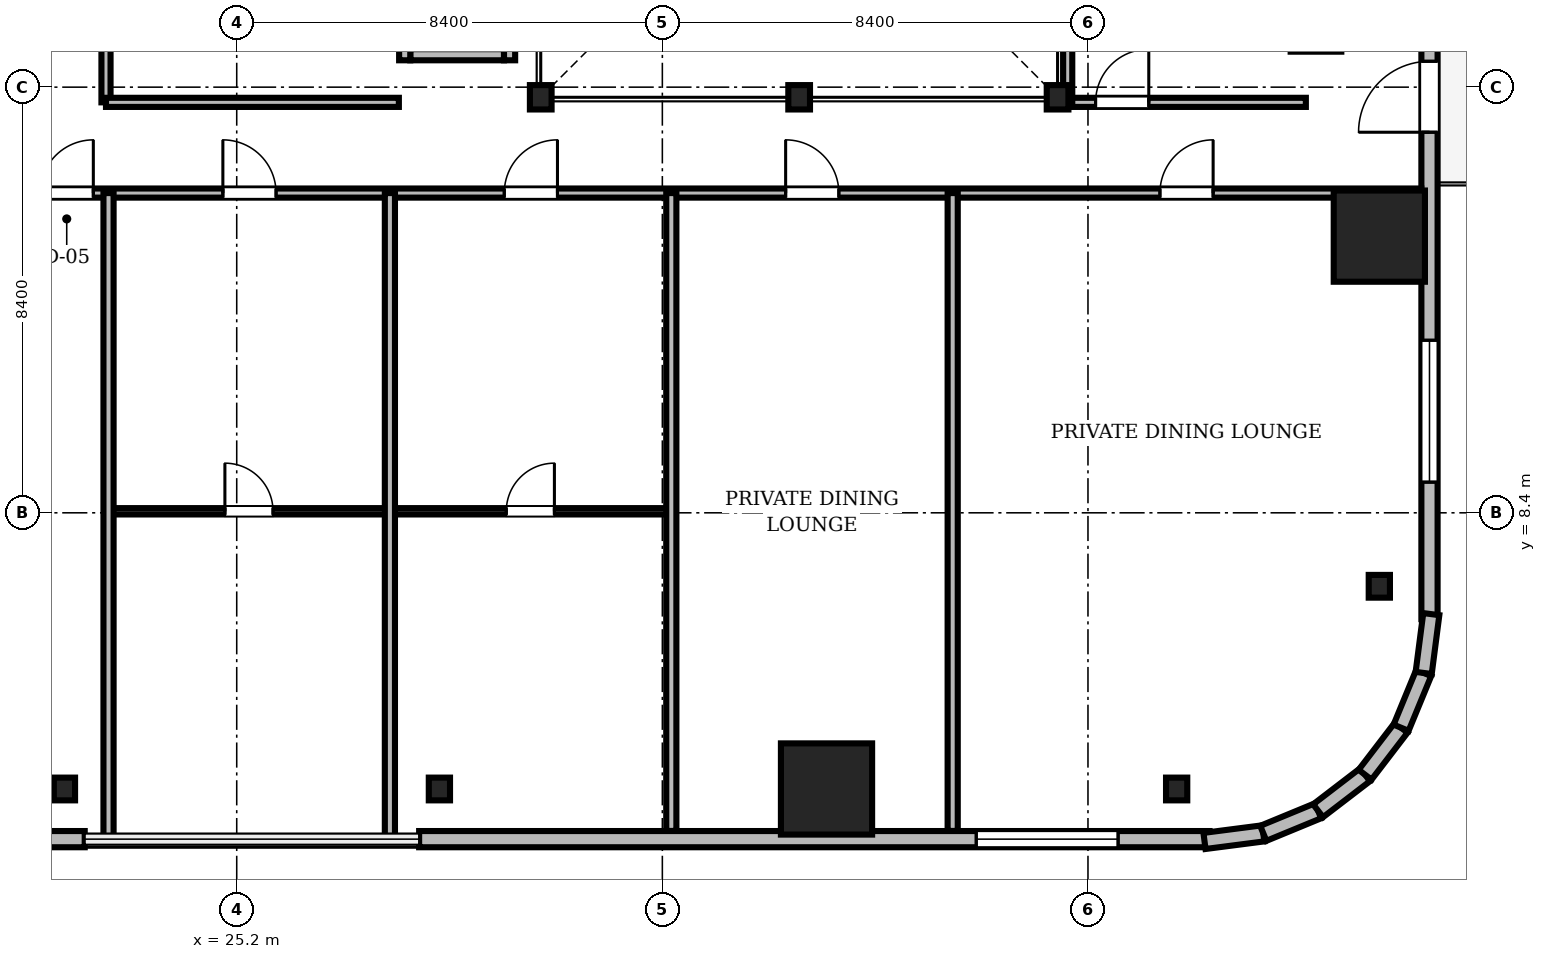
"""IFC4 building model, lengths in metres.
Left out: names, types, materials, properties, quantities, classifications, styles, units other than length and angle.
Written with IfcOpenShell. Run it as: python <this file> out.ifc"""

import sys

from ifc_helpers import new_model, si_unit, direction, frame, frame_2d, origin, origin_2d, place, context, subcontext, project, spatial, rectangle, i_section, extrude, source, transform, mapped, element, fill, save


model = new_model("IFC4")
c1 = context("Model", 3, precision=1e-05, world=origin(), true_north=direction((0.0, 1.0)))
c2 = subcontext(c1, "Body", "Model", "MODEL_VIEW")
j1 = project(units=[si_unit("LENGTHUNIT", "METRE"), si_unit("PLANEANGLEUNIT", "RADIAN")], contexts=[c1])
p1 = place(None, origin())
s1 = spatial("IfcSite", under=j1, at=p1, CompositionType="ELEMENT")
p2 = place(p1, origin())
s2 = spatial("IfcBuilding", under=s1, at=p2, CompositionType="ELEMENT")
p3 = place(p2, frame((0.0, 0.0, 71.4)))
s3 = spatial("IfcBuildingStorey", under=s2, at=p3, CompositionType="ELEMENT", Elevation=71.4)
m1 = source(origin(), c2, "Body", "SweptSolid", [
    extrude(i_section(OverallWidth=0.428, OverallDepth=0.481, WebThickness=0.04, FlangeThickness=0.063, FilletRadius=0.015, at=origin_2d()), origin(), (0.0, 0.0, 1.0), 3.41),
])
for number, where, z_axis, x_axis in (
    (1, (31.2, 16.6, 0.0), (0.0, 0.0, 1.0), (1.0, 0.0, 0.0)),
    (2, (36.3, 16.6, 0.0), (0.0, 0.0, 1.0), (1.0, 0.0, 0.0)),
    (3, (41.4, 16.6, 0.0), (0.0, 0.0, 1.0), (1.0, 0.0, 0.0)),
):
    element("IfcColumn", number, at=place(p3, frame(where, z_axis=z_axis, x_axis=x_axis)), inside=s3, PredefinedType="COLUMN", context=c2, shape_type="MappedRepresentation", body=[
        mapped(m1, transform((0.0, 0.0, 0.0), scale=1.0)),
    ])
m2 = source(origin(), c2, "Body", "SweptSolid", [
    extrude(rectangle(XDim=1.8, YDim=1.8, at=origin_2d()), origin(), (0.0, 0.0, 1.0), 3.41),
])
for number, where, z_axis, x_axis in (
    (4, (36.84, 2.95, 0.0), (0.0, 0.0, 1.0), (1.0, 0.0, 0.0)),
    (5, (47.75, 13.86, 0.0), (0.0, 0.0, 1.0), (1.0, 0.0, 0.0)),
):
    element("IfcColumn", number, at=place(p3, frame(where, z_axis=z_axis, x_axis=x_axis)), inside=s3, PredefinedType="COLUMN", context=c2, shape_type="MappedRepresentation", body=[
        mapped(m2, transform((0.0, 0.0, 0.0), scale=1.0)),
    ])
m3 = source(origin(), c2, "Body", "SweptSolid", [
    extrude(i_section(OverallWidth=0.419, OverallDepth=0.449, WebThickness=0.031, FlangeThickness=0.048, FilletRadius=0.015, at=origin_2d()), origin(), (0.0, 0.0, 1.0), 3.41),
])
for number, where, z_axis, x_axis in (
    (6, (21.8, 2.95, 0.0), (0.0, 0.0, 1.0), (1.0, 0.0, 0.0)),
    (7, (29.2, 2.95, 0.0), (0.0, 0.0, 1.0), (1.0, 0.0, 0.0)),
    (8, (43.75, 2.95, 0.0), (0.0, 0.0, 1.0), (1.0, 0.0, 0.0)),
    (9, (47.75, 6.95, 0.0), (0.0, 0.0, 1.0), (1.0, 0.0, 0.0)),
):
    element("IfcColumn", number, at=place(p3, frame(where, z_axis=z_axis, x_axis=x_axis)), inside=s3, PredefinedType="COLUMN", context=c2, shape_type="MappedRepresentation", body=[
        mapped(m3, transform((0.0, 0.0, 0.0), scale=1.0)),
    ])
m4 = source(origin(), c2, "Body", "SweptSolid", [
    extrude(rectangle(XDim=15.6, YDim=0.32, at=frame_2d((7.8, 0.0))), origin(), (0.0, 0.0, 1.0), 3.41),
])
p4 = place(p3, frame((6.6, 1.96, 0.0), z_axis=(0.0, 0.0, 1.0), x_axis=(1.0, 0.0, 0.0)))
e10 = element("IfcWall", 10, at=p4, inside=s3, PredefinedType="SOLIDWALL", context=c2, shape_type="MappedRepresentation", body=[
    mapped(m4, transform((0.0, 0.0, 0.0), scale=1.0)),
])
m5 = source(origin(), c2, "Body", "SweptSolid", [
    extrude(rectangle(XDim=1.4, YDim=2.3, at=frame_2d((0.7, 1.15))), frame((0.0, 0.17, 0.0), z_axis=(0.0, -1.0, 0.0), x_axis=(1.0, 0.0, 0.0)), (0.0, 0.0, 1.0), 0.34),
])
p5 = place(p4, frame((9.61, 0.0, 0.0)))
e11 = element("IfcOpeningElement", 11, at=p5, cuts=e10, PredefinedType="OPENING", context=c2, shape_type="MappedRepresentation", body=[
    mapped(m5, transform((0.0, 0.0, 0.0), scale=1.0)),
])
m6 = source(origin(), c2, "Body", "SweptSolid", [
    extrude(rectangle(XDim=2.8, YDim=2.4, at=frame_2d((1.4, 1.2))), frame((0.0, 0.17, 0.0), z_axis=(0.0, -1.0, 0.0), x_axis=(1.0, 0.0, 0.0)), (0.0, 0.0, 1.0), 0.34),
])
p6 = place(p4, frame((2.705, 0.0, 0.72)))
e12 = element("IfcOpeningElement", 12, at=p6, cuts=e10, PredefinedType="OPENING", context=c2, shape_type="MappedRepresentation", body=[
    mapped(m6, transform((0.0, 0.0, 0.0), scale=1.0)),
])
p7 = place(p3, frame((28.8, 1.96, 0.0), z_axis=(0.0, 0.0, 1.0), x_axis=(1.0, 0.0, 0.0)))
e13 = element("IfcWall", 13, at=p7, inside=s3, PredefinedType="SOLIDWALL", context=c2, shape_type="MappedRepresentation", body=[
    mapped(m4, transform((0.0, 0.0, 0.0), scale=1.0)),
])
p8 = place(p7, frame((10.995, 0.0, 0.72)))
e14 = element("IfcOpeningElement", 14, at=p8, cuts=e13, PredefinedType="OPENING", context=c2, shape_type="MappedRepresentation", body=[
    mapped(m6, transform((0.0, 0.0, 0.0), scale=1.0)),
])
p9 = place(p3, frame((48.74, 6.3, 0.0), z_axis=(0.0, 0.0, 1.0), x_axis=(0.0, 1.0, 0.0)))
e15 = element("IfcWall", 15, at=p9, inside=s3, PredefinedType="SOLIDWALL", context=c2, shape_type="MappedRepresentation", body=[
    mapped(m4, transform((0.0, 0.0, 0.0), scale=1.0)),
])
p10 = place(p9, frame((9.61, 0.0, 0.0)))
e16 = element("IfcOpeningElement", 16, at=p10, cuts=e15, PredefinedType="OPENING", context=c2, shape_type="MappedRepresentation", body=[
    mapped(m5, transform((0.0, 0.0, 0.0), scale=1.0)),
])
p11 = place(p9, frame((2.705, 0.0, 0.72)))
e17 = element("IfcOpeningElement", 17, at=p11, cuts=e15, PredefinedType="OPENING", context=c2, shape_type="MappedRepresentation", body=[
    mapped(m6, transform((0.0, 0.0, 0.0), scale=1.0)),
])
m7 = source(origin(), c2, "Body", "SweptSolid", [
    extrude(rectangle(XDim=1.17, YDim=0.32, at=frame_2d((0.585, 0.0))), origin(), (0.0, 0.0, 1.0), 3.41),
])
p12 = place(p3, frame((44.3, 1.925, 0.0), z_axis=(0.0, 0.0, 1.0), x_axis=(0.991762485493, 0.128090485085, 0.0)))
e18 = element("IfcWall", 18, at=p12, inside=s3, PredefinedType="SOLIDWALL", context=c2, shape_type="MappedRepresentation", body=[
    mapped(m7, transform((0.0, 0.0, 0.0), scale=1.0)),
])
m8 = source(origin(), c2, "Body", "SweptSolid", [
    extrude(rectangle(XDim=1.169, YDim=0.32, at=frame_2d((0.585, 0.0))), origin(), (0.0, 0.0, 1.0), 3.41),
])
p13 = place(p3, frame((45.46, 2.074, 0.0), z_axis=(0.0, 0.0, 1.0), x_axis=(0.924479075121, 0.381232789334, 0.0)))
e19 = element("IfcWall", 19, at=p13, inside=s3, PredefinedType="SOLIDWALL", context=c2, shape_type="MappedRepresentation", body=[
    mapped(m8, transform((0.0, 0.0, 0.0), scale=1.0)),
])
m9 = source(origin(), c2, "Body", "SweptSolid", [
    extrude(rectangle(XDim=1.169, YDim=0.32, at=frame_2d((0.584, 0.0))), origin(), (0.0, 0.0, 1.0), 3.41),
])
p14 = place(p3, frame((46.541, 2.52, 0.0), z_axis=(0.0, 0.0, 1.0), x_axis=(0.793663520347, 0.608356981114, 0.0)))
e20 = element("IfcWall", 20, at=p14, inside=s3, PredefinedType="SOLIDWALL", context=c2, shape_type="MappedRepresentation", body=[
    mapped(m9, transform((0.0, 0.0, 0.0), scale=1.0)),
])
m10 = source(origin(), c2, "Body", "SweptSolid", [
    extrude(rectangle(XDim=1.169, YDim=0.32, at=frame_2d((0.584, 0.0))), origin(), (0.0, 0.0, 1.0), 3.41),
])
for number, where, z_axis, x_axis in (
    (21, (47.469, 3.231, 0.0), (0.0, 0.0, 1.0), (0.608, 0.794, 0.0)),
    (22, (48.18, 4.159, 0.0), (0.0, 0.0, 1.0), (0.381, 0.925, 0.0)),
):
    element("IfcWall", number, at=place(p3, frame(where, z_axis=z_axis, x_axis=x_axis)), inside=s3, PredefinedType="SOLIDWALL", context=c2, shape_type="MappedRepresentation", body=[
        mapped(m10, transform((0.0, 0.0, 0.0), scale=1.0)),
    ])
m11 = source(origin(), c2, "Body", "SweptSolid", [
    extrude(rectangle(XDim=1.171, YDim=0.32, at=frame_2d((0.585, 0.0))), origin(), (0.0, 0.0, 1.0), 3.41),
])
p15 = place(p3, frame((48.625, 5.24, 0.0), z_axis=(0.0, 0.0, 1.0), x_axis=(0.128269133229, 0.991739395941, 0.0)))
e23 = element("IfcWall", 23, at=p15, inside=s3, PredefinedType="SOLIDWALL", context=c2, shape_type="MappedRepresentation", body=[
    mapped(m11, transform((0.0, 0.0, 0.0), scale=1.0)),
])
m12 = source(origin(), c2, "Body", "SweptSolid", [
    extrude(rectangle(XDim=1.85, YDim=0.22, at=frame_2d((0.925, 0.0))), origin(), (0.0, 0.0, 1.0), 3.41),
])
p16 = place(p3, frame((28.625, 17.44, 0.0), z_axis=(0.0, 0.0, 1.0), x_axis=(1.0, 0.0, 0.0)))
e24 = element("IfcWall", 24, at=p16, inside=s3, PredefinedType="SOLIDWALL", context=c2, shape_type="MappedRepresentation", body=[
    mapped(m12, transform((0.0, 0.0, 0.0), scale=1.0)),
])
m13 = source(origin(), c2, "Body", "SweptSolid", [
    extrude(rectangle(XDim=2.54, YDim=0.22, at=frame_2d((1.27, 0.0))), origin(), (0.0, 0.0, 1.0), 3.41),
])
for number, where, z_axis, x_axis in (
    (25, (28.515, 17.33, 0.0), (0.0, 0.0, 1.0), (0.0, 1.0, 0.0)),
    (26, (30.585, 17.33, 0.0), (0.0, 0.0, 1.0), (0.0, 1.0, 0.0)),
):
    element("IfcWall", number, at=place(p3, frame(where, z_axis=z_axis, x_axis=x_axis)), inside=s3, PredefinedType="SOLIDWALL", context=c2, shape_type="MappedRepresentation", body=[
        mapped(m13, transform((0.0, 0.0, 0.0), scale=1.0)),
    ])
m14 = source(origin(), c2, "Body", "SweptSolid", [
    extrude(rectangle(XDim=46.156, YDim=0.18, at=frame_2d((23.078, 0.0))), origin(), (0.0, 0.0, 1.0), 2.652),
])
p17 = place(p3, frame((2.422, 14.71, 0.0), z_axis=(0.0, 0.0, 1.0), x_axis=(1.0, 0.0, 0.0)))
e27 = element("IfcWall", 27, at=p17, inside=s3, PredefinedType="PARTITIONING", context=c2, shape_type="MappedRepresentation", body=[
    mapped(m14, transform((0.0, 0.0, 0.0), scale=1.0)),
])
m15 = source(origin(), c2, "Body", "SweptSolid", [
    extrude(rectangle(XDim=1.05, YDim=2.2, at=frame_2d((0.525, 1.1))), frame((0.0, 0.1, 0.0), z_axis=(0.0, -1.0, 0.0), x_axis=(1.0, 0.0, 0.0)), (0.0, 0.0, 1.0), 0.2),
])
p18 = place(p17, frame((18.898, 0.0, 0.0)))
e28 = element("IfcOpeningElement", 28, at=p18, cuts=e27, PredefinedType="OPENING", context=c2, shape_type="MappedRepresentation", body=[
    mapped(m15, transform((0.0, 0.0, 0.0), scale=1.0)),
])
p19 = place(p17, frame((22.505, 0.0, 0.0)))
e29 = element("IfcOpeningElement", 29, at=p19, cuts=e27, PredefinedType="OPENING", context=c2, shape_type="MappedRepresentation", body=[
    mapped(m15, transform((0.0, 0.0, 0.0), scale=1.0)),
])
p20 = place(p17, frame((28.058, 0.0, 0.0)))
e30 = element("IfcOpeningElement", 30, at=p20, cuts=e27, PredefinedType="OPENING", context=c2, shape_type="MappedRepresentation", body=[
    mapped(m15, transform((0.0, 0.0, 0.0), scale=1.0)),
])
p21 = place(p17, frame((33.611, 0.0, 0.0)))
e31 = element("IfcOpeningElement", 31, at=p21, cuts=e27, PredefinedType="OPENING", context=c2, shape_type="MappedRepresentation", body=[
    mapped(m15, transform((0.0, 0.0, 0.0), scale=1.0)),
])
p22 = place(p17, frame((40.998, 0.0, 0.0)))
e32 = element("IfcOpeningElement", 32, at=p22, cuts=e27, PredefinedType="OPENING", context=c2, shape_type="MappedRepresentation", body=[
    mapped(m15, transform((0.0, 0.0, 0.0), scale=1.0)),
])
m16 = source(origin(), c2, "Body", "SweptSolid", [
    extrude(rectangle(XDim=11.94, YDim=0.18, at=frame_2d((5.97, 0.0))), origin(), (0.0, 0.0, 1.0), 2.802),
])
p23 = place(p3, frame((22.62, 16.5, 0.0), z_axis=(0.0, 0.0, 1.0), x_axis=(0.0, 1.0, 0.0)))
e33 = element("IfcWall", 33, at=p23, inside=s3, PredefinedType="PARTITIONING", context=c2, shape_type="MappedRepresentation", body=[
    mapped(m16, transform((0.0, 0.0, 0.0), scale=1.0)),
])
p24 = place(p23, frame((4.5, 0.0, 0.0)))
e34 = element("IfcOpeningElement", 34, at=p24, cuts=e33, PredefinedType="OPENING", context=c2, shape_type="MappedRepresentation", body=[
    mapped(m15, transform((0.0, 0.0, 0.0), scale=1.0)),
])
m17 = source(origin(), c2, "Body", "SweptSolid", [
    extrude(rectangle(XDim=5.554, YDim=0.125, at=frame_2d((2.777, 0.0))), origin(), (0.0, 0.0, 1.0), 2.802),
])
p25 = place(p3, frame((28.223, 8.43, 0.0), z_axis=(0.0, 0.0, 1.0), x_axis=(1.0, 0.0, 0.0)))
e35 = element("IfcWall", 35, at=p25, inside=s3, PredefinedType="PARTITIONING", context=c2, shape_type="MappedRepresentation", body=[
    mapped(m17, transform((0.0, 0.0, 0.0), scale=1.0)),
])
m18 = source(origin(), c2, "Body", "SweptSolid", [
    extrude(rectangle(XDim=0.95, YDim=2.15, at=frame_2d((0.475, 1.075))), frame((0.0, 0.073, 0.0), z_axis=(0.0, -1.0, 0.0), x_axis=(1.0, 0.0, 0.0)), (0.0, 0.0, 1.0), 0.145),
])
p26 = place(p25, frame((2.297, 0.0, 0.0)))
e36 = element("IfcOpeningElement", 36, at=p26, cuts=e35, PredefinedType="OPENING", context=c2, shape_type="MappedRepresentation", body=[
    mapped(m18, transform((0.0, 0.0, 0.0), scale=1.0)),
])
m19 = source(origin(), c2, "Body", "SweptSolid", [
    extrude(rectangle(XDim=5.553, YDim=0.125, at=frame_2d((2.776, 0.0))), origin(), (0.0, 0.0, 1.0), 2.802),
])
p27 = place(p3, frame((22.67, 8.43, 0.0), z_axis=(0.0, 0.0, 1.0), x_axis=(1.0, 0.0, 0.0)))
e37 = element("IfcWall", 37, at=p27, inside=s3, PredefinedType="PARTITIONING", context=c2, shape_type="MappedRepresentation", body=[
    mapped(m19, transform((0.0, 0.0, 0.0), scale=1.0)),
])
p28 = place(p27, frame((2.297, 0.0, 0.0)))
e38 = element("IfcOpeningElement", 38, at=p28, cuts=e37, PredefinedType="OPENING", context=c2, shape_type="MappedRepresentation", body=[
    mapped(m18, transform((0.0, 0.0, 0.0), scale=1.0)),
])
m20 = source(origin(), c2, "Body", "SweptSolid", [
    extrude(rectangle(XDim=4.7, YDim=0.18, at=frame_2d((2.35, 0.0))), origin(), (0.0, 0.0, 1.0), 2.802),
])
p29 = place(p3, frame((41.6, 16.5, 0.0), z_axis=(0.0, 0.0, 1.0), x_axis=(1.0, 0.0, 0.0)))
e39 = element("IfcWall", 39, at=p29, inside=s3, PredefinedType="PARTITIONING", context=c2, shape_type="MappedRepresentation", body=[
    mapped(m20, transform((0.0, 0.0, 0.0), scale=1.0)),
])
p30 = place(p29, frame((0.55, 0.0, 0.0)))
e40 = element("IfcOpeningElement", 40, at=p30, cuts=e39, PredefinedType="OPENING", context=c2, shape_type="MappedRepresentation", body=[
    mapped(m15, transform((0.0, 0.0, 0.0), scale=1.0)),
])
m21 = source(origin(), c2, "Body", "SweptSolid", [
    extrude(rectangle(XDim=12.78, YDim=0.2, at=frame_2d((6.39, 0.0))), origin(), (0.0, 0.0, 1.0), 2.652),
])
for number, where, z_axis, x_axis in (
    (41, (22.67, 1.93, 0.0), (0.0, 0.0, 1.0), (0.0, 1.0, 0.0)),
    (42, (28.223, 1.93, 0.0), (0.0, 0.0, 1.0), (0.0, 1.0, 0.0)),
):
    element("IfcWall", number, at=place(p3, frame(where, z_axis=z_axis, x_axis=x_axis)), inside=s3, PredefinedType="PARTITIONING", context=c2, shape_type="MappedRepresentation", body=[
        mapped(m21, transform((0.0, 0.0, 0.0), scale=1.0)),
    ])
m22 = source(origin(), c2, "Body", "SweptSolid", [
    extrude(rectangle(XDim=12.588, YDim=0.2, at=frame_2d((6.294, 0.0))), origin(), (0.0, 0.0, 1.0), 2.652),
])
for number, where, z_axis, x_axis in (
    (43, (33.777, 2.122, 0.0), (0.0, 0.0, 1.0), (0.0, 1.0, 0.0)),
    (44, (39.33, 2.122, 0.0), (0.0, 0.0, 1.0), (0.0, 1.0, 0.0)),
):
    element("IfcWall", number, at=place(p3, frame(where, z_axis=z_axis, x_axis=x_axis)), inside=s3, PredefinedType="PARTITIONING", context=c2, shape_type="MappedRepresentation", body=[
        mapped(m22, transform((0.0, 0.0, 0.0), scale=1.0)),
    ])
m23 = source(origin(), c2, "Body", "SweptSolid", [
    extrude(rectangle(XDim=7.15, YDim=0.18, at=frame_2d((3.575, 0.0))), origin(), (0.0, 0.0, 1.0), 2.802),
])
p31 = place(p3, frame((41.6, 16.5, 0.0), z_axis=(0.0, 0.0, 1.0), x_axis=(0.0, 1.0, 0.0)))
e45 = element("IfcWall", 45, at=p31, inside=s3, PredefinedType="PARTITIONING", context=c2, shape_type="MappedRepresentation", body=[
    mapped(m23, transform((0.0, 0.0, 0.0), scale=1.0)),
])
m24 = source(origin(), c2, "Body", "SweptSolid", [
    extrude(rectangle(XDim=5.78, YDim=0.18, at=frame_2d((2.89, 0.0))), origin(), (0.0, 0.0, 1.0), 2.802),
])
p32 = place(p3, frame((22.62, 16.5, 0.0), z_axis=(0.0, 0.0, 1.0), x_axis=(1.0, 0.0, 0.0)))
e46 = element("IfcWall", 46, at=p32, inside=s3, PredefinedType="PARTITIONING", context=c2, shape_type="MappedRepresentation", body=[
    mapped(m24, transform((0.0, 0.0, 0.0), scale=1.0)),
])
m25 = source(origin(), c2, "Body", "SweptSolid", [
    extrude(rectangle(XDim=2.8, YDim=2.4, at=frame_2d((1.4, 1.2))), frame((0.0, 0.03, 0.0), z_axis=(0.0, -1.0, 0.0), x_axis=(1.0, 0.0, 0.0)), (0.0, 0.0, 1.0), 0.06),
])
p33 = place(p8, origin())
e47 = element("IfcWindow", 47, at=p33, inside=s3, PartitioningType="SINGLE_PANEL", PredefinedType="WINDOW", context=c2, shape_type="MappedRepresentation", body=[
    mapped(m25, transform((0.0, 0.0, 0.0), scale=1.0)),
])
fill(e14, e47)
m26 = source(origin(), c2, "Body", "SweptSolid", [
    extrude(rectangle(XDim=1.4, YDim=2.3, at=frame_2d((0.7, 1.15))), frame((0.0, 0.025, 0.0), z_axis=(0.0, -1.0, 0.0), x_axis=(1.0, 0.0, 0.0)), (0.0, 0.0, 1.0), 0.05),
])
p34 = place(p10, frame((1.4, 0.0, 0.0), z_axis=(0.0, 0.0, 1.0), x_axis=(-1.0, 0.0, 0.0)))
e48 = element("IfcDoor", 48, at=p34, inside=s3, OperationType="DOUBLE_DOOR_SLIDING", PredefinedType="DOOR", context=c2, shape_type="MappedRepresentation", body=[
    mapped(m26, transform((0.0, 0.0, 0.0), scale=1.0)),
])
fill(e16, e48)
p35 = place(p11, origin())
e49 = element("IfcWindow", 49, at=p35, inside=s3, PartitioningType="SINGLE_PANEL", PredefinedType="WINDOW", context=c2, shape_type="MappedRepresentation", body=[
    mapped(m25, transform((0.0, 0.0, 0.0), scale=1.0)),
])
fill(e17, e49)
m27 = source(origin(), c2, "Body", "SweptSolid", [
    extrude(rectangle(XDim=1.05, YDim=2.2, at=frame_2d((0.525, 1.1))), frame((0.0, 0.025, 0.0), z_axis=(0.0, -1.0, 0.0), x_axis=(1.0, 0.0, 0.0)), (0.0, 0.0, 1.0), 0.05),
])
p36 = place(p18, origin())
e50 = element("IfcDoor", 50, at=p36, inside=s3, OperationType="SINGLE_SWING_RIGHT", PredefinedType="DOOR", context=c2, shape_type="MappedRepresentation", body=[
    mapped(m27, transform((0.0, 0.0, 0.0), scale=1.0)),
])
fill(e28, e50)
p37 = place(p19, origin())
e51 = element("IfcDoor", 51, at=p37, inside=s3, OperationType="SINGLE_SWING_LEFT", PredefinedType="DOOR", context=c2, shape_type="MappedRepresentation", body=[
    mapped(m27, transform((0.0, 0.0, 0.0), scale=1.0)),
])
fill(e29, e51)
p38 = place(p20, origin())
e52 = element("IfcDoor", 52, at=p38, inside=s3, OperationType="SINGLE_SWING_RIGHT", PredefinedType="DOOR", context=c2, shape_type="MappedRepresentation", body=[
    mapped(m27, transform((0.0, 0.0, 0.0), scale=1.0)),
])
fill(e30, e52)
p39 = place(p21, origin())
e53 = element("IfcDoor", 53, at=p39, inside=s3, OperationType="SINGLE_SWING_LEFT", PredefinedType="DOOR", context=c2, shape_type="MappedRepresentation", body=[
    mapped(m27, transform((0.0, 0.0, 0.0), scale=1.0)),
])
fill(e31, e53)
p40 = place(p22, origin())
e54 = element("IfcDoor", 54, at=p40, inside=s3, OperationType="SINGLE_SWING_RIGHT", PredefinedType="DOOR", context=c2, shape_type="MappedRepresentation", body=[
    mapped(m27, transform((0.0, 0.0, 0.0), scale=1.0)),
])
fill(e32, e54)
m28 = source(origin(), c2, "Body", "SweptSolid", [
    extrude(rectangle(XDim=0.95, YDim=2.15, at=frame_2d((0.475, 1.075))), frame((0.0, 0.025, 0.0), z_axis=(0.0, -1.0, 0.0), x_axis=(1.0, 0.0, 0.0)), (0.0, 0.0, 1.0), 0.05),
])
p41 = place(p26, origin())
e55 = element("IfcDoor", 55, at=p41, inside=s3, OperationType="SINGLE_SWING_RIGHT", PredefinedType="DOOR", context=c2, shape_type="MappedRepresentation", body=[
    mapped(m28, transform((0.0, 0.0, 0.0), scale=1.0)),
])
fill(e36, e55)
p42 = place(p28, origin())
e56 = element("IfcDoor", 56, at=p42, inside=s3, OperationType="SINGLE_SWING_LEFT", PredefinedType="DOOR", context=c2, shape_type="MappedRepresentation", body=[
    mapped(m28, transform((0.0, 0.0, 0.0), scale=1.0)),
])
fill(e38, e56)
p43 = place(p30, origin())
e57 = element("IfcDoor", 57, at=p43, inside=s3, OperationType="SINGLE_SWING_RIGHT", PredefinedType="DOOR", context=c2, shape_type="MappedRepresentation", body=[
    mapped(m27, transform((0.0, 0.0, 0.0), scale=1.0)),
])
fill(e40, e57)
save(model, sys.argv[1])
